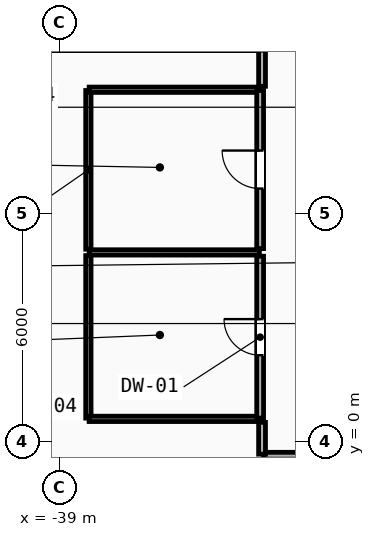
"""IFC4 building model, lengths in metres.
Left out: names, types, materials, properties, quantities, classifications, styles, units other than length and angle.
Written with IfcOpenShell. Run it as: python <this file> out.ifc"""

import sys

from ifc_helpers import new_model, si_unit, direction, frame, frame_2d, origin, place, context, subcontext, project, spatial, rectangle, extrude, element, fill, save


model = new_model("IFC4")
c1 = context("Model", 3, precision=1e-05, world=origin(), true_north=direction((0.0, 1.0)))
c2 = subcontext(c1, "Body", "Model", "MODEL_VIEW")
j1 = project(units=[si_unit("LENGTHUNIT", "METRE"), si_unit("PLANEANGLEUNIT", "RADIAN")], contexts=[c1])
p1 = place(None, origin())
s1 = spatial("IfcSite", under=j1, at=p1, CompositionType="ELEMENT")
p2 = place(p1, origin())
s2 = spatial("IfcBuilding", under=s1, at=p2, CompositionType="ELEMENT")
p3 = place(p2, frame((0.0, 0.0, 180.0)))
s3 = spatial("IfcBuildingStorey", under=s2, at=p3, CompositionType="ELEMENT", Elevation=180.0)
p4 = place(p3, frame((-38.24, 0.62, 0.0), z_axis=(0.0, 0.0, 1.0), x_axis=(0.0, 1.0, 0.0)))
e1 = element("IfcWall", 1, at=p4, inside=s3, PredefinedType="PARTITIONING", context=c2, shape_type="SweptSolid", body=[
    extrude(rectangle(XDim=4.275, YDim=0.14, at=frame_2d((2.137, 0.0))), origin(), (0.0, 0.0, 1.0), 3.36),
])
p5 = place(p3, frame((-38.24, 5.065, 0.0), z_axis=(0.0, 0.0, 1.0), x_axis=(0.0, 1.0, 0.0)))
e2 = element("IfcWall", 2, at=p5, inside=s3, PredefinedType="PARTITIONING", context=c2, shape_type="SweptSolid", body=[
    extrude(rectangle(XDim=4.175, YDim=0.14, at=frame_2d((2.087, 0.0))), origin(), (0.0, 0.0, 1.0), 3.36),
])
for number, where, z_axis, x_axis in (
    (3, (-38.22, 0.6, 0.0), (0.0, 0.0, 1.0), (1.0, 0.0, 0.0)),
    (4, (-38.22, 4.98, 0.0), (0.0, 0.0, 1.0), (1.0, 0.0, 0.0)),
    (5, (-38.22, 9.26, 0.0), (0.0, 0.0, 1.0), (1.0, 0.0, 0.0)),
):
    element("IfcWall", number, at=place(p3, frame(where, z_axis=z_axis, x_axis=x_axis)), inside=s3, PredefinedType="PARTITIONING", context=c2, shape_type="SweptSolid", body=[
        extrude(rectangle(XDim=4.48, YDim=0.14, at=frame_2d((2.24, 0.0))), origin(), (0.0, 0.0, 1.0), 3.36),
    ])
p6 = place(p3, frame((-33.72, 0.62, 0.0), z_axis=(0.0, 0.0, 1.0), x_axis=(0.0, 1.0, 0.0)))
e6 = element("IfcWall", 6, at=p6, inside=s3, PredefinedType="PARTITIONING", context=c2, shape_type="SweptSolid", body=[
    extrude(rectangle(XDim=4.26, YDim=0.18, at=frame_2d((2.13, 0.0))), origin(), (0.0, 0.0, 1.0), 3.36),
])
p7 = place(p6, frame((1.655, 0.0, 0.0)))
e7 = element("IfcOpeningElement", 7, at=p7, cuts=e6, PredefinedType="OPENING", context=c2, shape_type="SweptSolid", body=[
    extrude(rectangle(XDim=0.95, YDim=2.1, at=frame_2d((0.475, 1.05))), frame((0.0, 0.1, 0.0), z_axis=(0.0, -1.0, 0.0), x_axis=(1.0, 0.0, 0.0)), (0.0, 0.0, 1.0), 0.2),
])
p8 = place(p3, frame((-33.72, 5.08, 0.0), z_axis=(0.0, 0.0, 1.0), x_axis=(0.0, 1.0, 0.0)))
e8 = element("IfcWall", 8, at=p8, inside=s3, PredefinedType="PARTITIONING", context=c2, shape_type="SweptSolid", body=[
    extrude(rectangle(XDim=4.16, YDim=0.18, at=frame_2d((2.08, 0.0))), origin(), (0.0, 0.0, 1.0), 3.36),
])
p9 = place(p8, frame((1.58, 0.0, 0.0)))
e9 = element("IfcOpeningElement", 9, at=p9, cuts=e8, PredefinedType="OPENING", context=c2, shape_type="SweptSolid", body=[
    extrude(rectangle(XDim=1.0, YDim=2.15, at=frame_2d((0.5, 1.075))), frame((0.0, 0.1, 0.0), z_axis=(0.0, -1.0, 0.0), x_axis=(1.0, 0.0, 0.0)), (0.0, 0.0, 1.0), 0.2),
])
p10 = place(p3, frame((-33.628, -0.37, 0.0), z_axis=(0.0, 0.0, 1.0), x_axis=(1.0, 0.0, 0.0)))
e10 = element("IfcWall", 10, at=p10, inside=s3, PredefinedType="PARTITIONING", context=c2, shape_type="SweptSolid", body=[
    extrude(rectangle(XDim=5.628, YDim=0.18, at=frame_2d((2.814, 0.0))), origin(), (0.0, 0.0, 1.0), 3.36),
])
p11 = place(p3, frame((-33.67, 10.3, 0.0), z_axis=(0.0, 0.0, 1.0), x_axis=(0.0, -1.0, 0.0)))
e11 = element("IfcWall", 11, at=p11, inside=s3, PredefinedType="PARTITIONING", context=c2, shape_type="SweptSolid", body=[
    extrude(rectangle(XDim=0.949, YDim=0.18, at=frame_2d((0.474, 0.0))), origin(), (0.0, 0.0, 1.0), 3.36),
])
p12 = place(p3, frame((-33.67, 0.509, 0.0), z_axis=(0.0, 0.0, 1.0), x_axis=(0.0, -1.0, 0.0)))
e12 = element("IfcWall", 12, at=p12, inside=s3, PredefinedType="PARTITIONING", context=c2, shape_type="SweptSolid", body=[
    extrude(rectangle(XDim=0.837, YDim=0.18, at=frame_2d((0.418, 0.0))), origin(), (0.0, 0.0, 1.0), 3.36),
])
p13 = place(p7, origin())
e13 = element("IfcDoor", 13, at=p13, inside=s3, OperationType="SINGLE_SWING_RIGHT", PredefinedType="DOOR", context=c2, shape_type="SweptSolid", body=[
    extrude(rectangle(XDim=0.95, YDim=2.1, at=frame_2d((0.475, 1.05))), frame((0.0, 0.025, 0.0), z_axis=(0.0, -1.0, 0.0), x_axis=(1.0, 0.0, 0.0)), (0.0, 0.0, 1.0), 0.05),
])
fill(e7, e13)
p14 = place(p9, origin())
e14 = element("IfcDoor", 14, at=p14, inside=s3, OperationType="SINGLE_SWING_RIGHT", PredefinedType="DOOR", context=c2, shape_type="SweptSolid", body=[
    extrude(rectangle(XDim=1.0, YDim=2.15, at=frame_2d((0.5, 1.075))), frame((0.0, 0.025, 0.0), z_axis=(0.0, -1.0, 0.0), x_axis=(1.0, 0.0, 0.0)), (0.0, 0.0, 1.0), 0.05),
])
fill(e9, e14)
save(model, sys.argv[1])
